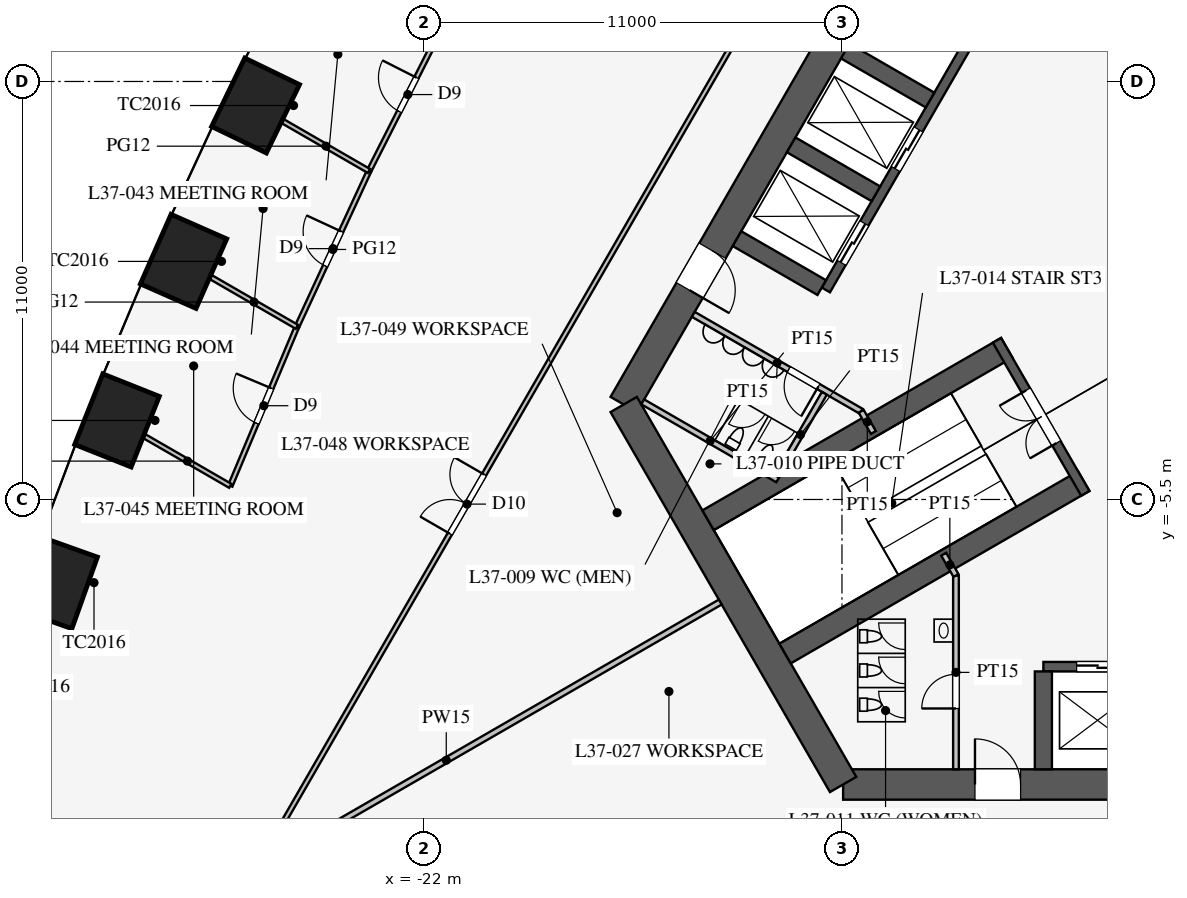
"""IFC4 building model, lengths in metres.
Left out: names, types, materials, properties, quantities, classifications, styles, units other than length and angle.
Written with IfcOpenShell. Run it as: python <this file> out.ifc"""

import sys

from ifc_helpers import new_model, si_unit, direction, frame, frame_2d, origin, origin_2d, place, context, subcontext, project, spatial, rectangle, extrude, element, fill, save


model = new_model("IFC4")
c1 = context("Model", 3, precision=1e-05, world=origin(), true_north=direction((0.0, 1.0)))
c2 = subcontext(c1, "Body", "Model", "MODEL_VIEW")
j1 = project(units=[si_unit("LENGTHUNIT", "METRE"), si_unit("PLANEANGLEUNIT", "RADIAN")], contexts=[c1])
p1 = place(None, origin())
s1 = spatial("IfcSite", under=j1, at=p1, CompositionType="ELEMENT")
p2 = place(p1, origin())
s2 = spatial("IfcBuilding", under=s1, at=p2, CompositionType="ELEMENT")
p3 = place(p2, frame((0.0, 0.0, 161.9)))
s3 = spatial("IfcBuildingStorey", under=s2, at=p3, CompositionType="ELEMENT", Elevation=161.9)
for number, where, z_axis, x_axis in (
    (1, (-26.43, 4.867, 0.0), (0.0, 0.0, 1.0), (-0.436, -0.9, 0.0)),
    (2, (-28.325, 0.765, 0.0), (0.0, 0.0, 1.0), (-0.403, -0.915, 0.0)),
    (3, (-30.077, -3.42, 0.0), (0.0, 0.0, 1.0), (-0.37, -0.929, 0.0)),
    (4, (-31.682, -7.689, 0.0), (0.0, 0.0, 1.0), (-0.336, -0.942, 0.0)),
):
    element("IfcColumn", number, at=place(p3, frame(where, z_axis=z_axis, x_axis=x_axis)), inside=s3, PredefinedType="COLUMN", context=c2, shape_type="SweptSolid", body=[
        extrude(rectangle(XDim=2.0, YDim=1.6, at=origin_2d()), origin(), (0.0, 0.0, 1.0), 4.2),
    ])
p4 = place(p3, frame((-10.97, -13.0, 0.0), z_axis=(0.0, 0.0, 1.0), x_axis=(1.0, 0.0, 0.0)))
e5 = element("IfcWall", 5, at=p4, inside=s3, PredefinedType="SHEAR", context=c2, shape_type="SweptSolid", body=[
    extrude(rectangle(XDim=21.939, YDim=0.8, at=frame_2d((10.97, 0.0))), origin(), (0.0, 0.0, 1.0), 4.2),
])
p5 = place(p4, frame((17.27, 0.0, 0.0)))
e6 = element("IfcOpeningElement", 6, at=p5, cuts=e5, PredefinedType="OPENING", context=c2, shape_type="SweptSolid", body=[
    extrude(rectangle(XDim=1.2, YDim=2.1, at=frame_2d((0.6, 1.05))), frame((0.0, 0.41, 0.0), z_axis=(0.0, -1.0, 0.0), x_axis=(1.0, 0.0, 0.0)), (0.0, 0.0, 1.0), 0.82),
])
p6 = place(p4, frame((3.47, 0.0, 0.0)))
e7 = element("IfcOpeningElement", 7, at=p6, cuts=e5, PredefinedType="OPENING", context=c2, shape_type="SweptSolid", body=[
    extrude(rectangle(XDim=1.2, YDim=2.1, at=frame_2d((0.6, 1.05))), frame((0.0, 0.41, 0.0), z_axis=(0.0, -1.0, 0.0), x_axis=(1.0, 0.0, 0.0)), (0.0, 0.0, 1.0), 0.82),
])
p7 = place(p3, frame((-5.773, 16.0, 0.0), z_axis=(0.0, 0.0, 1.0), x_axis=(-0.500002442456, -0.866023993627, 0.0)))
e8 = element("IfcWall", 8, at=p7, inside=s3, PredefinedType="SHEAR", context=c2, shape_type="SweptSolid", body=[
    extrude(rectangle(XDim=21.939, YDim=0.8, at=frame_2d((10.97, 0.0))), origin(), (0.0, 0.0, 1.0), 4.2),
])
p8 = place(p7, frame((17.27, 0.0, 0.0)))
e9 = element("IfcOpeningElement", 9, at=p8, cuts=e8, PredefinedType="OPENING", context=c2, shape_type="SweptSolid", body=[
    extrude(rectangle(XDim=1.2, YDim=2.1, at=frame_2d((0.6, 1.05))), frame((0.0, 0.41, 0.0), z_axis=(0.0, -1.0, 0.0), x_axis=(1.0, 0.0, 0.0)), (0.0, 0.0, 1.0), 0.82),
])
p9 = place(p7, frame((3.47, 0.0, 0.0)))
e10 = element("IfcOpeningElement", 10, at=p9, cuts=e8, PredefinedType="OPENING", context=c2, shape_type="SweptSolid", body=[
    extrude(rectangle(XDim=1.2, YDim=2.1, at=frame_2d((0.6, 1.05))), frame((0.0, 0.41, 0.0), z_axis=(0.0, -1.0, 0.0), x_axis=(1.0, 0.0, 0.0)), (0.0, 0.0, 1.0), 0.82),
])
p10 = place(p3, frame((-16.743, -3.0, 0.0), z_axis=(0.0, 0.0, 1.0), x_axis=(0.499995765644, -0.866027848477, 0.0)))
e11 = element("IfcWall", 11, at=p10, inside=s3, PredefinedType="SHEAR", context=c2, shape_type="SweptSolid", body=[
    extrude(rectangle(XDim=11.547, YDim=0.8, at=frame_2d((5.773, 0.0))), origin(), (0.0, 0.0, 1.0), 4.2),
])
p11 = place(p3, frame((-5.7, -9.9, 0.0), z_axis=(0.0, 0.0, 1.0), x_axis=(1.0, 0.0, 0.0)))
e12 = element("IfcWall", 12, at=p11, inside=s3, PredefinedType="SHEAR", context=c2, shape_type="SweptSolid", body=[
    extrude(rectangle(XDim=11.4, YDim=0.25, at=frame_2d((5.7, 0.0))), origin(), (0.0, 0.0, 1.0), 4.2),
])
p12 = place(p11, frame((0.875, 0.0, 0.0)))
e13 = element("IfcOpeningElement", 13, at=p12, cuts=e12, PredefinedType="OPENING", context=c2, shape_type="SweptSolid", body=[
    extrude(rectangle(XDim=1.1, YDim=2.2, at=frame_2d((0.55, 1.1))), frame((0.0, 0.135, 0.0), z_axis=(0.0, -1.0, 0.0), x_axis=(1.0, 0.0, 0.0)), (0.0, 0.0, 1.0), 0.27),
])
p13 = place(p11, frame((3.725, 0.0, 0.0)))
e14 = element("IfcOpeningElement", 14, at=p13, cuts=e12, PredefinedType="OPENING", context=c2, shape_type="SweptSolid", body=[
    extrude(rectangle(XDim=1.1, YDim=2.2, at=frame_2d((0.55, 1.1))), frame((0.0, 0.135, 0.0), z_axis=(0.0, -1.0, 0.0), x_axis=(1.0, 0.0, 0.0)), (0.0, 0.0, 1.0), 0.27),
])
p14 = place(p11, frame((6.575, 0.0, 0.0)))
e15 = element("IfcOpeningElement", 15, at=p14, cuts=e12, PredefinedType="OPENING", context=c2, shape_type="SweptSolid", body=[
    extrude(rectangle(XDim=1.1, YDim=2.2, at=frame_2d((0.55, 1.1))), frame((0.0, 0.135, 0.0), z_axis=(0.0, -1.0, 0.0), x_axis=(1.0, 0.0, 0.0)), (0.0, 0.0, 1.0), 0.27),
])
p15 = place(p11, frame((9.425, 0.0, 0.0)))
e16 = element("IfcOpeningElement", 16, at=p15, cuts=e12, PredefinedType="OPENING", context=c2, shape_type="SweptSolid", body=[
    extrude(rectangle(XDim=1.1, YDim=2.2, at=frame_2d((0.55, 1.1))), frame((0.0, 0.135, 0.0), z_axis=(0.0, -1.0, 0.0), x_axis=(1.0, 0.0, 0.0)), (0.0, 0.0, 1.0), 0.27),
])
p16 = place(p3, frame((-5.7, -10.025, 0.0), z_axis=(0.0, 0.0, 1.0), x_axis=(0.0, -1.0, 0.0)))
e17 = element("IfcWall", 17, at=p16, inside=s3, PredefinedType="SHEAR", context=c2, shape_type="SweptSolid", body=[
    extrude(rectangle(XDim=2.575, YDim=0.45, at=frame_2d((1.288, 0.0))), origin(), (0.0, 0.0, 1.0), 4.2),
])
p17 = place(p3, frame((-5.724, 9.886, 0.0), z_axis=(0.0, 0.0, 1.0), x_axis=(-0.500001763848, -0.866024385424, 0.0)))
e18 = element("IfcWall", 18, at=p17, inside=s3, PredefinedType="SHEAR", context=c2, shape_type="SweptSolid", body=[
    extrude(rectangle(XDim=11.4, YDim=0.25, at=frame_2d((5.7, 0.0))), origin(), (0.0, 0.0, 1.0), 4.2),
])
p18 = place(p17, frame((6.525, 0.0, 0.0)))
e19 = element("IfcOpeningElement", 19, at=p18, cuts=e18, PredefinedType="OPENING", context=c2, shape_type="SweptSolid", body=[
    extrude(rectangle(XDim=1.2, YDim=2.2, at=frame_2d((0.6, 1.1))), frame((0.0, 0.135, 0.0), z_axis=(0.0, -1.0, 0.0), x_axis=(1.0, 0.0, 0.0)), (0.0, 0.0, 1.0), 0.27),
])
p19 = place(p17, frame((9.375, 0.0, 0.0)))
e20 = element("IfcOpeningElement", 20, at=p19, cuts=e18, PredefinedType="OPENING", context=c2, shape_type="SweptSolid", body=[
    extrude(rectangle(XDim=1.2, YDim=2.2, at=frame_2d((0.6, 1.1))), frame((0.0, 0.135, 0.0), z_axis=(0.0, -1.0, 0.0), x_axis=(1.0, 0.0, 0.0)), (0.0, 0.0, 1.0), 0.27),
])
for number, where, z_axis, x_axis in (
    (21, (-8.682, 5.012, 0.0), (0.0, 0.0, 1.0), (-0.866, 0.5, 0.0)),
    (22, (-10.107, 2.544, 0.0), (0.0, 0.0, 1.0), (-0.866, 0.5, 0.0)),
    (23, (-11.532, 0.076, 0.0), (0.0, 0.0, 1.0), (-0.866, 0.5, 0.0)),
):
    element("IfcWall", number, at=place(p3, frame(where, z_axis=z_axis, x_axis=x_axis)), inside=s3, PredefinedType="SHEAR", context=c2, shape_type="SweptSolid", body=[
        extrude(rectangle(XDim=2.575, YDim=0.45, at=frame_2d((1.288, 0.0))), origin(), (0.0, 0.0, 1.0), 4.2),
    ])
for number, where, z_axis, x_axis in (
    (24, (-6.663, -1.509, 0.0), (0.0, 0.0, 1.0), (-0.866, -0.5, 0.0)),
    (25, (-4.638, -5.016, 0.0), (0.0, 0.0, 1.0), (-0.866, -0.5, 0.0)),
):
    element("IfcWall", number, at=place(p3, frame(where, z_axis=z_axis, x_axis=x_axis)), inside=s3, PredefinedType="SHEAR", context=c2, shape_type="SweptSolid", body=[
        extrude(rectangle(XDim=9.075, YDim=0.6, at=frame_2d((4.538, 0.0))), origin(), (0.0, 0.0, 1.0), 4.2),
    ])
p20 = place(p3, frame((-6.922, -1.312, 0.0), z_axis=(0.0, 0.0, 1.0), x_axis=(0.499984536904, -0.866034331223, 0.0)))
e26 = element("IfcWall", 26, at=p20, inside=s3, PredefinedType="SHEAR", context=c2, shape_type="SweptSolid", body=[
    extrude(rectangle(XDim=4.65, YDim=0.25, at=frame_2d((2.325, 0.0))), origin(), (0.0, 0.0, 1.0), 4.2),
])
p21 = place(p20, frame((1.525, 0.0, 0.0)))
e27 = element("IfcOpeningElement", 27, at=p21, cuts=e26, PredefinedType="OPENING", context=c2, shape_type="SweptSolid", body=[
    extrude(rectangle(XDim=1.6, YDim=2.1, at=frame_2d((0.8, 1.05))), frame((0.0, 0.135, 0.0), z_axis=(0.0, -1.0, 0.0), x_axis=(1.0, 0.0, 0.0)), (0.0, 0.0, 1.0), 0.27),
])
p22 = place(p3, frame((-8.0, -7.5, 0.0), z_axis=(0.0, 0.0, 1.0), x_axis=(0.0, -1.0, 0.0)))
e28 = element("IfcWall", 28, at=p22, inside=s3, PredefinedType="PARTITIONING", context=c2, shape_type="SweptSolid", body=[
    extrude(rectangle(XDim=5.1, YDim=0.15, at=frame_2d((2.55, 0.0))), origin(), (0.0, 0.0, 1.0), 4.0),
])
p23 = place(p22, frame((2.6, 0.0, 0.0)))
e29 = element("IfcOpeningElement", 29, at=p23, cuts=e28, PredefinedType="OPENING", context=c2, shape_type="SweptSolid", body=[
    extrude(rectangle(XDim=0.9, YDim=2.1, at=frame_2d((0.45, 1.05))), frame((0.0, 0.085, 0.0), z_axis=(0.0, -1.0, 0.0), x_axis=(1.0, 0.0, 0.0)), (0.0, 0.0, 1.0), 0.17),
])
p24 = place(p3, frame((-10.495, -3.178, 0.0), z_axis=(0.0, 0.0, 1.0), x_axis=(-0.86602216432, 0.500005610874, 0.0)))
e30 = element("IfcWall", 30, at=p24, inside=s3, PredefinedType="PARTITIONING", context=c2, shape_type="SweptSolid", body=[
    extrude(rectangle(XDim=5.1, YDim=0.15, at=frame_2d((2.55, 0.0))), origin(), (0.0, 0.0, 1.0), 4.0),
])
p25 = place(p24, frame((1.3, 0.0, 0.0)))
e31 = element("IfcOpeningElement", 31, at=p25, cuts=e30, PredefinedType="OPENING", context=c2, shape_type="SweptSolid", body=[
    extrude(rectangle(XDim=0.9, YDim=2.1, at=frame_2d((0.45, 1.05))), frame((0.0, 0.085, 0.0), z_axis=(0.0, -1.0, 0.0), x_axis=(1.0, 0.0, 0.0)), (0.0, 0.0, 1.0), 0.17),
])
for number, where, z_axis, x_axis in (
    (32, (-10.495, -3.178, 0.0), (0.0, 0.0, 1.0), (0.5, -0.866, 0.0)),
    (33, (-8.0, -7.5, 0.0), (0.0, 0.0, 1.0), (-0.5, 0.866, 0.0)),
):
    element("IfcWall", number, at=place(p3, frame(where, z_axis=z_axis, x_axis=x_axis)), inside=s3, PredefinedType="PARTITIONING", context=c2, shape_type="SweptSolid", body=[
        extrude(rectangle(XDim=0.645, YDim=0.15, at=frame_2d((0.323, 0.0))), origin(), (0.0, 0.0, 1.0), 4.0),
    ])
p26 = place(p3, frame((-12.691, -4.982, 0.0), z_axis=(0.0, 0.0, 1.0), x_axis=(-0.8660249478, 0.500000789788, 0.0)))
e34 = element("IfcWall", 34, at=p26, inside=s3, PredefinedType="PARTITIONING", context=c2, shape_type="SweptSolid", body=[
    extrude(rectangle(XDim=4.1, YDim=0.15, at=frame_2d((2.05, 0.0))), origin(), (0.0, 0.0, 1.0), 4.0),
])
p27 = place(p3, frame((-11.464, -2.706, 0.0), z_axis=(0.0, 0.0, 1.0), x_axis=(-0.50001992892, -0.866013897511, 0.0)))
e35 = element("IfcWall", 35, at=p27, inside=s3, PredefinedType="PARTITIONING", context=c2, shape_type="SweptSolid", body=[
    extrude(rectangle(XDim=2.51, YDim=0.15, at=frame_2d((1.255, 0.0))), origin(), (0.0, 0.0, 1.0), 4.0),
])
p28 = place(p3, frame((-14.203, -8.2, 0.0), z_axis=(0.0, 0.0, 1.0), x_axis=(-0.866024668836, -0.500001272966, 0.0)))
e36 = element("IfcWall", 36, at=p28, inside=s3, PredefinedType="PARTITIONING", context=c2, shape_type="SweptSolid", body=[
    extrude(rectangle(XDim=16.65, YDim=0.15, at=frame_2d((8.325, 0.0))), origin(), (0.0, 0.0, 1.0), 2.3),
])
p29 = place(p3, frame((-0.016, 30.491, 0.0), z_axis=(0.0, 0.0, 1.0), x_axis=(-0.50000091641, -0.866024874695, 0.0)))
e37 = element("IfcWall", 37, at=p29, inside=s3, PredefinedType="PARTITIONING", context=c2, shape_type="SweptSolid", body=[
    extrude(rectangle(XDim=52.796, YDim=0.12, at=frame_2d((26.398, 0.0))), origin(), (0.0, 0.0, 1.0), 2.9),
])
p30 = place(p29, frame((10.2, 0.0, 0.15)))
e38 = element("IfcOpeningElement", 38, at=p30, cuts=e37, PredefinedType="OPENING", context=c2, shape_type="SweptSolid", body=[
    extrude(rectangle(XDim=1.8, YDim=2.1, at=frame_2d((0.9, 1.05))), frame((0.0, 0.07, 0.0), z_axis=(0.0, -1.0, 0.0), x_axis=(1.0, 0.0, 0.0)), (0.0, 0.0, 1.0), 0.14),
])
p31 = place(p29, frame((40.8, 0.0, 0.15)))
e39 = element("IfcOpeningElement", 39, at=p31, cuts=e37, PredefinedType="OPENING", context=c2, shape_type="SweptSolid", body=[
    extrude(rectangle(XDim=1.8, YDim=2.1, at=frame_2d((0.9, 1.05))), frame((0.0, 0.07, 0.0), z_axis=(0.0, -1.0, 0.0), x_axis=(1.0, 0.0, 0.0)), (0.0, 0.0, 1.0), 0.14),
])
p32 = place(p3, frame((-25.342, -0.958, 0.0), z_axis=(0.0, 0.0, 1.0), x_axis=(-0.386807881778, -0.922160323693, 0.0)))
e40 = element("IfcWall", 40, at=p32, inside=s3, PredefinedType="PARTITIONING", context=c2, shape_type="SweptSolid", body=[
    extrude(rectangle(XDim=4.536, YDim=0.12, at=frame_2d((2.268, 0.0))), origin(), (0.0, 0.0, 1.0), 2.9),
])
p33 = place(p32, frame((1.75, 0.0, 0.15)))
e41 = element("IfcOpeningElement", 41, at=p33, cuts=e40, PredefinedType="OPENING", context=c2, shape_type="SweptSolid", body=[
    extrude(rectangle(XDim=1.0, YDim=2.1, at=frame_2d((0.5, 1.05))), frame((0.0, 0.07, 0.0), z_axis=(0.0, -1.0, 0.0), x_axis=(1.0, 0.0, 0.0)), (0.0, 0.0, 1.0), 0.14),
])
p34 = place(p3, frame((-21.405, 7.162, 0.0), z_axis=(0.0, 0.0, 1.0), x_axis=(-0.452471679136, -0.891778772779, 0.0)))
e42 = element("IfcWall", 42, at=p34, inside=s3, PredefinedType="PARTITIONING", context=c2, shape_type="SweptSolid", body=[
    extrude(rectangle(XDim=4.507, YDim=0.12, at=frame_2d((2.253, 0.0))), origin(), (0.0, 0.0, 1.0), 2.9),
])
p35 = place(p34, frame((1.75, 0.0, 0.15)))
e43 = element("IfcOpeningElement", 43, at=p35, cuts=e42, PredefinedType="OPENING", context=c2, shape_type="SweptSolid", body=[
    extrude(rectangle(XDim=1.0, YDim=2.1, at=frame_2d((0.5, 1.05))), frame((0.0, 0.07, 0.0), z_axis=(0.0, -1.0, 0.0), x_axis=(1.0, 0.0, 0.0)), (0.0, 0.0, 1.0), 0.14),
])
p36 = place(p3, frame((-23.444, 3.143, 0.0), z_axis=(0.0, 0.0, 1.0), x_axis=(-0.419883773418, -0.907577884713, 0.0)))
e44 = element("IfcWall", 44, at=p36, inside=s3, PredefinedType="PARTITIONING", context=c2, shape_type="SweptSolid", body=[
    extrude(rectangle(XDim=4.519, YDim=0.12, at=frame_2d((2.259, 0.0))), origin(), (0.0, 0.0, 1.0), 2.9),
])
p37 = place(p36, frame((1.75, 0.0, 0.15)))
e45 = element("IfcOpeningElement", 45, at=p37, cuts=e44, PredefinedType="OPENING", context=c2, shape_type="SweptSolid", body=[
    extrude(rectangle(XDim=1.0, YDim=2.1, at=frame_2d((0.5, 1.05))), frame((0.0, 0.07, 0.0), z_axis=(0.0, -1.0, 0.0), x_axis=(1.0, 0.0, 0.0)), (0.0, 0.0, 1.0), 0.14),
])
p38 = place(p3, frame((-25.342, -0.958, 0.0), z_axis=(0.0, 0.0, 1.0), x_axis=(-0.866036074319, 0.499981517636, 0.0)))
e46 = element("IfcWall", 46, at=p38, inside=s3, PredefinedType="PARTITIONING", context=c2, shape_type="SweptSolid", body=[
    extrude(rectangle(XDim=2.61, YDim=0.12, at=frame_2d((1.305, 0.0))), origin(), (0.0, 0.0, 1.0), 2.6),
])
p39 = place(p3, frame((-27.096, -5.141, 0.0), z_axis=(0.0, 0.0, 1.0), x_axis=(-0.866012205188, 0.500022859943, 0.0)))
e47 = element("IfcWall", 47, at=p39, inside=s3, PredefinedType="PARTITIONING", context=c2, shape_type="SweptSolid", body=[
    extrude(rectangle(XDim=2.603, YDim=0.12, at=frame_2d((1.302, 0.0))), origin(), (0.0, 0.0, 1.0), 2.8),
])
p40 = place(p3, frame((-23.444, 3.143, 0.0), z_axis=(0.0, 0.0, 1.0), x_axis=(-0.866011491631, 0.500024095782, 0.0)))
e48 = element("IfcWall", 48, at=p40, inside=s3, PredefinedType="PARTITIONING", context=c2, shape_type="SweptSolid", body=[
    extrude(rectangle(XDim=2.615, YDim=0.12, at=frame_2d((1.308, 0.0))), origin(), (0.0, 0.0, 1.0), 2.9),
])
p41 = place(p23, frame((0.9, 0.0, 0.0), z_axis=(0.0, 0.0, 1.0), x_axis=(-1.0, 0.0, 0.0)))
e49 = element("IfcDoor", 49, at=p41, inside=s3, OperationType="SINGLE_SWING_LEFT", PredefinedType="DOOR", context=c2, shape_type="SweptSolid", body=[
    extrude(rectangle(XDim=0.9, YDim=2.1, at=frame_2d((0.45, 1.05))), frame((0.0, 0.025, 0.0), z_axis=(0.0, -1.0, 0.0), x_axis=(1.0, 0.0, 0.0)), (0.0, 0.0, 1.0), 0.05),
])
fill(e29, e49)
p42 = place(p25, origin())
e50 = element("IfcDoor", 50, at=p42, inside=s3, OperationType="SINGLE_SWING_LEFT", PredefinedType="DOOR", context=c2, shape_type="SweptSolid", body=[
    extrude(rectangle(XDim=0.9, YDim=2.1, at=frame_2d((0.45, 1.05))), frame((0.0, 0.025, 0.0), z_axis=(0.0, -1.0, 0.0), x_axis=(1.0, 0.0, 0.0)), (0.0, 0.0, 1.0), 0.05),
])
fill(e31, e50)
p43 = place(p21, frame((1.6, 0.0, 0.0), z_axis=(0.0, 0.0, 1.0), x_axis=(-1.0, 0.0, 0.0)))
e51 = element("IfcDoor", 51, at=p43, inside=s3, OperationType="DOUBLE_DOOR_SINGLE_SWING", PredefinedType="DOOR", context=c2, shape_type="SweptSolid", body=[
    extrude(rectangle(XDim=1.6, YDim=2.1, at=frame_2d((0.8, 1.05))), frame((0.0, 0.025, 0.0), z_axis=(0.0, -1.0, 0.0), x_axis=(1.0, 0.0, 0.0)), (0.0, 0.0, 1.0), 0.05),
])
fill(e27, e51)
p44 = place(p6, origin())
e52 = element("IfcDoor", 52, at=p44, inside=s3, OperationType="SINGLE_SWING_LEFT", PredefinedType="DOOR", context=c2, shape_type="SweptSolid", body=[
    extrude(rectangle(XDim=1.2, YDim=2.1, at=frame_2d((0.6, 1.05))), frame((0.0, 0.025, 0.0), z_axis=(0.0, -1.0, 0.0), x_axis=(1.0, 0.0, 0.0)), (0.0, 0.0, 1.0), 0.05),
])
fill(e7, e52)
p45 = place(p8, origin())
e53 = element("IfcDoor", 53, at=p45, inside=s3, OperationType="SINGLE_SWING_RIGHT", PredefinedType="DOOR", context=c2, shape_type="SweptSolid", body=[
    extrude(rectangle(XDim=1.2, YDim=2.1, at=frame_2d((0.6, 1.05))), frame((0.0, 0.025, 0.0), z_axis=(0.0, -1.0, 0.0), x_axis=(1.0, 0.0, 0.0)), (0.0, 0.0, 1.0), 0.05),
])
fill(e9, e53)
p46 = place(p35, frame((1.0, 0.0, 0.0), z_axis=(0.0, 0.0, 1.0), x_axis=(-1.0, 0.0, 0.0)))
e54 = element("IfcDoor", 54, at=p46, inside=s3, OperationType="SINGLE_SWING_RIGHT", PredefinedType="DOOR", context=c2, shape_type="SweptSolid", body=[
    extrude(rectangle(XDim=1.0, YDim=2.1, at=frame_2d((0.5, 1.05))), frame((0.0, 0.025, 0.0), z_axis=(0.0, -1.0, 0.0), x_axis=(1.0, 0.0, 0.0)), (0.0, 0.0, 1.0), 0.05),
])
fill(e43, e54)
p47 = place(p37, frame((1.0, 0.0, 0.0), z_axis=(0.0, 0.0, 1.0), x_axis=(-1.0, 0.0, 0.0)))
e55 = element("IfcDoor", 55, at=p47, inside=s3, OperationType="SINGLE_SWING_RIGHT", PredefinedType="DOOR", context=c2, shape_type="SweptSolid", body=[
    extrude(rectangle(XDim=1.0, YDim=2.1, at=frame_2d((0.5, 1.05))), frame((0.0, 0.025, 0.0), z_axis=(0.0, -1.0, 0.0), x_axis=(1.0, 0.0, 0.0)), (0.0, 0.0, 1.0), 0.05),
])
fill(e45, e55)
p48 = place(p33, frame((1.0, 0.0, 0.0), z_axis=(0.0, 0.0, 1.0), x_axis=(-1.0, 0.0, 0.0)))
e56 = element("IfcDoor", 56, at=p48, inside=s3, OperationType="SINGLE_SWING_RIGHT", PredefinedType="DOOR", context=c2, shape_type="SweptSolid", body=[
    extrude(rectangle(XDim=1.0, YDim=2.1, at=frame_2d((0.5, 1.05))), frame((0.0, 0.025, 0.0), z_axis=(0.0, -1.0, 0.0), x_axis=(1.0, 0.0, 0.0)), (0.0, 0.0, 1.0), 0.05),
])
fill(e41, e56)
p49 = place(p31, frame((1.8, 0.0, 0.0), z_axis=(0.0, 0.0, 1.0), x_axis=(-1.0, 0.0, 0.0)))
e57 = element("IfcDoor", 57, at=p49, inside=s3, OperationType="DOUBLE_DOOR_SINGLE_SWING", PredefinedType="DOOR", context=c2, shape_type="SweptSolid", body=[
    extrude(rectangle(XDim=1.8, YDim=2.1, at=frame_2d((0.9, 1.05))), frame((0.0, 0.025, 0.0), z_axis=(0.0, -1.0, 0.0), x_axis=(1.0, 0.0, 0.0)), (0.0, 0.0, 1.0), 0.05),
])
fill(e39, e57)
p50 = place(p12, origin())
e58 = element("IfcDoor", 58, at=p50, inside=s3, OperationType="DOUBLE_DOOR_SLIDING", PredefinedType="DOOR", context=c2, shape_type="SweptSolid", body=[
    extrude(rectangle(XDim=1.1, YDim=2.2, at=frame_2d((0.55, 1.1))), frame((0.0, 0.025, 0.0), z_axis=(0.0, -1.0, 0.0), x_axis=(1.0, 0.0, 0.0)), (0.0, 0.0, 1.0), 0.05),
])
fill(e13, e58)
p51 = place(p18, origin())
e59 = element("IfcDoor", 59, at=p51, inside=s3, OperationType="DOUBLE_DOOR_SLIDING", PredefinedType="DOOR", context=c2, shape_type="SweptSolid", body=[
    extrude(rectangle(XDim=1.2, YDim=2.2, at=frame_2d((0.6, 1.1))), frame((0.0, 0.025, 0.0), z_axis=(0.0, -1.0, 0.0), x_axis=(1.0, 0.0, 0.0)), (0.0, 0.0, 1.0), 0.05),
])
fill(e19, e59)
p52 = place(p19, origin())
e60 = element("IfcDoor", 60, at=p52, inside=s3, OperationType="DOUBLE_DOOR_SLIDING", PredefinedType="DOOR", context=c2, shape_type="SweptSolid", body=[
    extrude(rectangle(XDim=1.2, YDim=2.2, at=frame_2d((0.6, 1.1))), frame((0.0, 0.025, 0.0), z_axis=(0.0, -1.0, 0.0), x_axis=(1.0, 0.0, 0.0)), (0.0, 0.0, 1.0), 0.05),
])
fill(e20, e60)
save(model, sys.argv[1])
